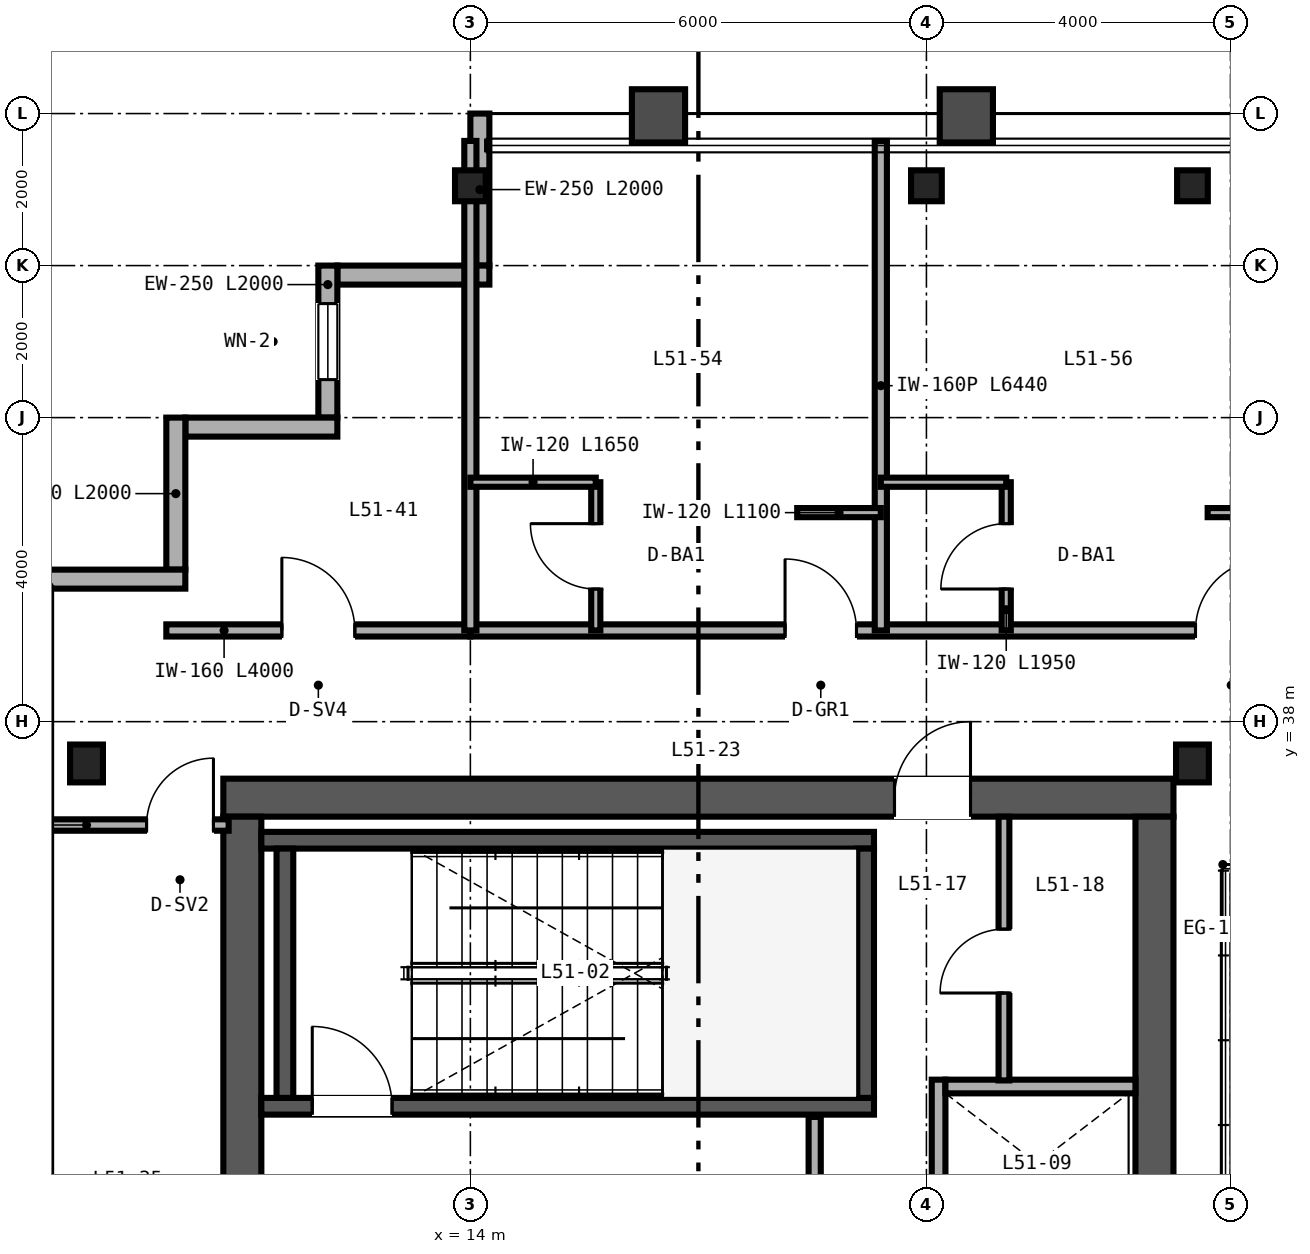
"""IFC4 building model, lengths in metres.
Left out: names, types, materials, properties, quantities, classifications, styles, units other than length and angle.
Written with IfcOpenShell. Run it as: python <this file> out.ifc"""

import sys

from ifc_helpers import new_model, si_unit, direction, frame, frame_2d, origin, origin_2d, place, context, subcontext, project, spatial, rectangle, i_section, extrude, source, transform, mapped, element, fill, save


model = new_model("IFC4")
c1 = context("Model", 3, precision=1e-05, world=origin(), true_north=direction((0.0, 1.0)))
c2 = subcontext(c1, "Body", "Model", "MODEL_VIEW")
j1 = project(units=[si_unit("LENGTHUNIT", "METRE"), si_unit("PLANEANGLEUNIT", "RADIAN")], contexts=[c1])
p1 = place(None, origin())
s1 = spatial("IfcSite", under=j1, at=p1, CompositionType="ELEMENT")
p2 = place(p1, origin())
s2 = spatial("IfcBuilding", under=s1, at=p2, CompositionType="ELEMENT")
p3 = place(p2, frame((0.0, 0.0, 202.8)))
s3 = spatial("IfcBuildingStorey", under=s2, at=p3, CompositionType="ELEMENT", Elevation=202.8)
p4 = place(p3, frame((10.75, 37.0, 0.0), z_axis=(0.0, 0.0, 1.0), x_axis=(1.0, 0.0, 0.0)))
e1 = element("IfcWall", 1, at=p4, inside=s3, PredefinedType="SHEAR", context=c2, shape_type="SweptSolid", body=[
    extrude(rectangle(XDim=12.5, YDim=0.5, at=frame_2d((6.25, 0.0))), origin(), (0.0, 0.0, 1.0), 3.37),
])
p5 = place(p4, frame((8.83, 0.0, 0.0)))
e2 = element("IfcOpeningElement", 2, at=p5, cuts=e1, PredefinedType="OPENING", context=c2, shape_type="SweptSolid", body=[
    extrude(rectangle(XDim=1.0, YDim=2.15, at=frame_2d((0.5, 1.075))), frame((0.0, 0.26, 0.0), z_axis=(0.0, -1.0, 0.0), x_axis=(1.0, 0.0, 0.0)), (0.0, 0.0, 1.0), 0.52),
])
for number, where, z_axis, x_axis in (
    (3, (11.0, 15.25, 0.0), (0.0, 0.0, 1.0), (0.0, 1.0, 0.0)),
    (4, (23.0, 15.25, 0.0), (0.0, 0.0, 1.0), (0.0, 1.0, 0.0)),
):
    element("IfcWall", number, at=place(p3, frame(where, z_axis=z_axis, x_axis=x_axis)), inside=s3, PredefinedType="SHEAR", context=c2, shape_type="SweptSolid", body=[
        extrude(rectangle(XDim=21.5, YDim=0.5, at=frame_2d((10.75, 0.0))), origin(), (0.0, 0.0, 1.0), 3.37),
    ])
p6 = place(p3, frame((11.25, 32.94, 0.0), z_axis=(0.0, 0.0, 1.0), x_axis=(1.0, 0.0, 0.0)))
e5 = element("IfcWall", 5, at=p6, inside=s3, PredefinedType="SHEAR", context=c2, shape_type="SweptSolid", body=[
    extrude(rectangle(XDim=8.06, YDim=0.22, at=frame_2d((4.03, 0.0))), origin(), (0.0, 0.0, 1.0), 3.4),
])
p7 = place(p6, frame((0.67, 0.0, 0.0)))
e6 = element("IfcOpeningElement", 6, at=p7, cuts=e5, PredefinedType="OPENING", context=c2, shape_type="SweptSolid", body=[
    extrude(rectangle(XDim=1.05, YDim=2.15, at=frame_2d((0.525, 1.075))), frame((0.0, 0.12, 0.0), z_axis=(0.0, -1.0, 0.0), x_axis=(1.0, 0.0, 0.0)), (0.0, 0.0, 1.0), 0.24),
])
p8 = place(p3, frame((11.25, 36.44, 0.0), z_axis=(0.0, 0.0, 1.0), x_axis=(1.0, 0.0, 0.0)))
e7 = element("IfcWall", 7, at=p8, inside=s3, PredefinedType="SHEAR", context=c2, shape_type="SweptSolid", body=[
    extrude(rectangle(XDim=8.06, YDim=0.22, at=frame_2d((4.03, 0.0))), origin(), (0.0, 0.0, 1.0), 3.4),
])
for number, where, z_axis, x_axis in (
    (8, (11.56, 33.05, 0.0), (0.0, 0.0, 1.0), (0.0, 1.0, 0.0)),
    (9, (19.2, 33.05, 0.0), (0.0, 0.0, 1.0), (0.0, 1.0, 0.0)),
):
    element("IfcWall", number, at=place(p3, frame(where, z_axis=z_axis, x_axis=x_axis)), inside=s3, PredefinedType="SHEAR", context=c2, shape_type="SweptSolid", body=[
        extrude(rectangle(XDim=3.28, YDim=0.22, at=frame_2d((1.64, 0.0))), origin(), (0.0, 0.0, 1.0), 3.4),
    ])
m1 = source(origin(), c2, "Body", "SweptSolid", [
    extrude(i_section(OverallWidth=0.432, OverallDepth=0.498, WebThickness=0.056, FlangeThickness=0.089, FilletRadius=0.025, at=origin_2d()), origin(), (0.0, 0.0, 1.0), 3.37),
])
for number, where, z_axis, x_axis in (
    (10, (8.95, 37.45, 0.0), (0.0, 0.0, 1.0), (1.0, 0.0, 0.0)),
    (11, (23.5, 37.45, 0.0), (0.0, 0.0, 1.0), (1.0, 0.0, 0.0)),
):
    element("IfcColumn", number, at=place(p3, frame(where, z_axis=z_axis, x_axis=x_axis)), inside=s3, PredefinedType="COLUMN", context=c2, shape_type="MappedRepresentation", body=[
        mapped(m1, transform((0.0, 0.0, 0.0), scale=1.0)),
    ])
m2 = source(origin(), c2, "Body", "SweptSolid", [
    extrude(i_section(OverallWidth=0.404, OverallDepth=0.407, WebThickness=0.027, FlangeThickness=0.044, FilletRadius=0.025, at=origin_2d()), origin(), (0.0, 0.0, 1.0), 3.37),
])
for number, where, z_axis, x_axis in (
    (12, (14.0, 45.05, 0.0), (0.0, 0.0, 1.0), (1.0, 0.0, 0.0)),
    (13, (20.0, 45.05, 0.0), (0.0, 0.0, 1.0), (1.0, 0.0, 0.0)),
    (14, (23.5, 45.05, 0.0), (0.0, 0.0, 1.0), (1.0, 0.0, 0.0)),
):
    element("IfcColumn", number, at=place(p3, frame(where, z_axis=z_axis, x_axis=x_axis)), inside=s3, PredefinedType="COLUMN", context=c2, shape_type="MappedRepresentation", body=[
        mapped(m2, transform((0.0, 0.0, 0.0), scale=1.0)),
    ])
p9 = place(p3, frame((14.125, 46.0, 0.0), z_axis=(0.0, 0.0, 1.0), x_axis=(0.0, -1.0, 0.0)))
e15 = element("IfcWall", 15, at=p9, inside=s3, PredefinedType="SOLIDWALL", context=c2, shape_type="SweptSolid", body=[
    extrude(rectangle(XDim=2.0, YDim=0.25, at=frame_2d((1.0, 0.0))), origin(), (0.0, 0.0, 1.0), 2.677),
])
p10 = place(p3, frame((14.25, 43.875, 0.0), z_axis=(0.0, 0.0, 1.0), x_axis=(-1.0, 0.0, 0.0)))
e16 = element("IfcWall", 16, at=p10, inside=s3, PredefinedType="SOLIDWALL", context=c2, shape_type="SweptSolid", body=[
    extrude(rectangle(XDim=2.0, YDim=0.25, at=frame_2d((1.0, 0.0))), origin(), (0.0, 0.0, 1.0), 3.37),
])
p11 = place(p3, frame((12.125, 44.0, 0.0), z_axis=(0.0, 0.0, 1.0), x_axis=(0.0, -1.0, 0.0)))
e17 = element("IfcWall", 17, at=p11, inside=s3, PredefinedType="SOLIDWALL", context=c2, shape_type="SweptSolid", body=[
    extrude(rectangle(XDim=2.0, YDim=0.25, at=frame_2d((1.0, 0.0))), origin(), (0.0, 0.0, 1.0), 3.37),
])
p12 = place(p11, frame((0.5, 0.0, 0.85)))
e18 = element("IfcOpeningElement", 18, at=p12, cuts=e17, PredefinedType="OPENING", context=c2, shape_type="SweptSolid", body=[
    extrude(rectangle(XDim=1.0, YDim=1.9, at=frame_2d((0.5, 0.95))), frame((0.0, 0.135, 0.0), z_axis=(0.0, -1.0, 0.0), x_axis=(1.0, 0.0, 0.0)), (0.0, 0.0, 1.0), 0.27),
])
for number, where, z_axis, x_axis in (
    (19, (12.25, 41.875, 0.0), (0.0, 0.0, 1.0), (-1.0, 0.0, 0.0)),
    (20, (10.125, 42.0, 0.0), (0.0, 0.0, 1.0), (0.0, -1.0, 0.0)),
):
    element("IfcWall", number, at=place(p3, frame(where, z_axis=z_axis, x_axis=x_axis)), inside=s3, PredefinedType="SOLIDWALL", context=c2, shape_type="SweptSolid", body=[
        extrude(rectangle(XDim=2.0, YDim=0.25, at=frame_2d((1.0, 0.0))), origin(), (0.0, 0.0, 1.0), 3.37),
    ])
p13 = place(p3, frame((10.25, 39.875, 0.0), z_axis=(0.0, 0.0, 1.0), x_axis=(-1.0, 0.0, 0.0)))
e21 = element("IfcWall", 21, at=p13, inside=s3, PredefinedType="SOLIDWALL", context=c2, shape_type="SweptSolid", body=[
    extrude(rectangle(XDim=2.25, YDim=0.25, at=frame_2d((1.125, 0.0))), origin(), (0.0, 0.0, 1.0), 3.37),
])
p14 = place(p3, frame((20.16, 29.0, 0.0), z_axis=(0.0, 0.0, 1.0), x_axis=(0.0, 1.0, 0.0)))
e22 = element("IfcWall", 22, at=p14, inside=s3, PredefinedType="SOLIDWALL", context=c2, shape_type="SweptSolid", body=[
    extrude(rectangle(XDim=4.29, YDim=0.18, at=frame_2d((2.145, 0.0))), origin(), (0.0, 0.0, 1.0), 3.37),
])
p15 = place(p3, frame((20.25, 33.2, 0.0), z_axis=(0.0, 0.0, 1.0), x_axis=(1.0, 0.0, 0.0)))
e23 = element("IfcWall", 23, at=p15, inside=s3, PredefinedType="SOLIDWALL", context=c2, shape_type="SweptSolid", body=[
    extrude(rectangle(XDim=2.5, YDim=0.18, at=frame_2d((1.25, 0.0))), origin(), (0.0, 0.0, 1.0), 3.37),
])
p16 = place(p3, frame((18.53, 28.9, 0.0), z_axis=(0.0, 0.0, 1.0), x_axis=(0.0, 1.0, 0.0)))
e24 = element("IfcWall", 24, at=p16, inside=s3, PredefinedType="PARTITIONING", context=c2, shape_type="SweptSolid", body=[
    extrude(rectangle(XDim=3.9, YDim=0.16, at=frame_2d((1.95, 0.0))), origin(), (0.0, 0.0, 1.0), 3.37),
])
p17 = place(p16, frame((1.5, 0.0, 0.0)))
e25 = element("IfcOpeningElement", 25, at=p17, cuts=e24, PredefinedType="OPENING", context=c2, shape_type="SweptSolid", body=[
    extrude(rectangle(XDim=1.0, YDim=2.15, at=frame_2d((0.5, 1.075))), frame((0.0, 0.09, 0.0), z_axis=(0.0, -1.0, 0.0), x_axis=(1.0, 0.0, 0.0)), (0.0, 0.0, 1.0), 0.18),
])
p18 = place(p3, frame((21.02, 33.28, 0.0), z_axis=(0.0, 0.0, 1.0), x_axis=(0.0, 1.0, 0.0)))
e26 = element("IfcWall", 26, at=p18, inside=s3, PredefinedType="PARTITIONING", context=c2, shape_type="SweptSolid", body=[
    extrude(rectangle(XDim=3.47, YDim=0.142, at=frame_2d((1.735, 0.0))), origin(), (0.0, 0.0, 1.0), 3.37),
])
p19 = place(p18, frame((1.15, 0.0, 0.0)))
e27 = element("IfcOpeningElement", 27, at=p19, cuts=e26, PredefinedType="OPENING", context=c2, shape_type="SweptSolid", body=[
    extrude(rectangle(XDim=0.84, YDim=2.1, at=frame_2d((0.42, 1.05))), frame((0.0, 0.081, 0.0), z_axis=(0.0, -1.0, 0.0), x_axis=(1.0, 0.0, 0.0)), (0.0, 0.0, 1.0), 0.162),
])
p20 = place(p3, frame((8.16, 36.64, 0.0), z_axis=(0.0, 0.0, 1.0), x_axis=(1.0, 0.0, 0.0)))
e28 = element("IfcWall", 28, at=p20, inside=s3, PredefinedType="PARTITIONING", context=c2, shape_type="SweptSolid", body=[
    extrude(rectangle(XDim=2.66, YDim=0.15, at=frame_2d((1.33, 0.0))), origin(), (0.0, 0.0, 1.0), 2.753),
])
p21 = place(p20, frame((1.58, 0.0, 0.0)))
e29 = element("IfcOpeningElement", 29, at=p21, cuts=e28, PredefinedType="OPENING", context=c2, shape_type="SweptSolid", body=[
    extrude(rectangle(XDim=0.88, YDim=2.15, at=frame_2d((0.44, 1.075))), frame((0.0, 0.085, 0.0), z_axis=(0.0, -1.0, 0.0), x_axis=(1.0, 0.0, 0.0)), (0.0, 0.0, 1.0), 0.17),
])
p22 = place(p3, frame((10.0, 39.2, 0.0), z_axis=(0.0, 0.0, 1.0), x_axis=(1.0, 0.0, 0.0)))
e30 = element("IfcWall", 30, at=p22, inside=s3, PredefinedType="PARTITIONING", context=c2, shape_type="SweptSolid", body=[
    extrude(rectangle(XDim=4.0, YDim=0.16, at=frame_2d((2.0, 0.0))), origin(), (0.0, 0.0, 1.0), 3.37),
])
p23 = place(p22, frame((1.52, 0.0, 0.0)))
e31 = element("IfcOpeningElement", 31, at=p23, cuts=e30, PredefinedType="OPENING", context=c2, shape_type="SweptSolid", body=[
    extrude(rectangle(XDim=0.96, YDim=2.15, at=frame_2d((0.48, 1.075))), frame((0.0, 0.09, 0.0), z_axis=(0.0, -1.0, 0.0), x_axis=(1.0, 0.0, 0.0)), (0.0, 0.0, 1.0), 0.18),
])
p24 = place(p3, frame((14.0, 39.2, 0.0), z_axis=(0.0, 0.0, 1.0), x_axis=(1.0, 0.0, 0.0)))
e32 = element("IfcWall", 32, at=p24, inside=s3, PredefinedType="PARTITIONING", context=c2, shape_type="SweptSolid", body=[
    extrude(rectangle(XDim=36.0, YDim=0.16, at=frame_2d((18.0, 0.0))), origin(), (0.0, 0.0, 1.0), 2.913),
])
p25 = place(p24, frame((4.14, 0.0, 0.0)))
e33 = element("IfcOpeningElement", 33, at=p25, cuts=e32, PredefinedType="OPENING", context=c2, shape_type="SweptSolid", body=[
    extrude(rectangle(XDim=0.94, YDim=2.15, at=frame_2d((0.47, 1.075))), frame((0.0, 0.09, 0.0), z_axis=(0.0, -1.0, 0.0), x_axis=(1.0, 0.0, 0.0)), (0.0, 0.0, 1.0), 0.18),
])
p26 = place(p24, frame((9.54, 0.0, 0.0)))
e34 = element("IfcOpeningElement", 34, at=p26, cuts=e32, PredefinedType="OPENING", context=c2, shape_type="SweptSolid", body=[
    extrude(rectangle(XDim=0.94, YDim=2.15, at=frame_2d((0.47, 1.075))), frame((0.0, 0.09, 0.0), z_axis=(0.0, -1.0, 0.0), x_axis=(1.0, 0.0, 0.0)), (0.0, 0.0, 1.0), 0.18),
])
p27 = place(p24, frame((13.32, 0.0, 0.0)))
e35 = element("IfcOpeningElement", 35, at=p27, cuts=e32, PredefinedType="OPENING", context=c2, shape_type="SweptSolid", body=[
    extrude(rectangle(XDim=0.96, YDim=2.15, at=frame_2d((0.48, 1.075))), frame((0.0, 0.09, 0.0), z_axis=(0.0, -1.0, 0.0), x_axis=(1.0, 0.0, 0.0)), (0.0, 0.0, 1.0), 0.18),
])
p28 = place(p24, frame((21.54, 0.0, 0.0)))
e36 = element("IfcOpeningElement", 36, at=p28, cuts=e32, PredefinedType="OPENING", context=c2, shape_type="SweptSolid", body=[
    extrude(rectangle(XDim=0.94, YDim=2.15, at=frame_2d((0.47, 1.075))), frame((0.0, 0.09, 0.0), z_axis=(0.0, -1.0, 0.0), x_axis=(1.0, 0.0, 0.0)), (0.0, 0.0, 1.0), 0.18),
])
p29 = place(p24, frame((28.14, 0.0, 0.0)))
e37 = element("IfcOpeningElement", 37, at=p29, cuts=e32, PredefinedType="OPENING", context=c2, shape_type="SweptSolid", body=[
    extrude(rectangle(XDim=0.94, YDim=2.15, at=frame_2d((0.47, 1.075))), frame((0.0, 0.09, 0.0), z_axis=(0.0, -1.0, 0.0), x_axis=(1.0, 0.0, 0.0)), (0.0, 0.0, 1.0), 0.18),
])
p30 = place(p24, frame((34.74, 0.0, 0.0)))
e38 = element("IfcOpeningElement", 38, at=p30, cuts=e32, PredefinedType="OPENING", context=c2, shape_type="SweptSolid", body=[
    extrude(rectangle(XDim=0.94, YDim=2.15, at=frame_2d((0.47, 1.075))), frame((0.0, 0.09, 0.0), z_axis=(0.0, -1.0, 0.0), x_axis=(1.0, 0.0, 0.0)), (0.0, 0.0, 1.0), 0.18),
])
for number, where, z_axis, x_axis in (
    (39, (14.0, 39.2, 0.0), (0.0, 0.0, 1.0), (0.0, 1.0, 0.0)),
    (40, (19.4, 39.2, 0.0), (0.0, 0.0, 1.0), (0.0, 1.0, 0.0)),
):
    element("IfcWall", number, at=place(p3, frame(where, z_axis=z_axis, x_axis=x_axis)), inside=s3, PredefinedType="PARTITIONING", context=c2, shape_type="SweptSolid", body=[
        extrude(rectangle(XDim=6.44, YDim=0.16, at=frame_2d((3.22, 0.0))), origin(), (0.0, 0.0, 1.0), 2.677),
    ])
p31 = place(p3, frame((15.65, 39.2, 0.0), z_axis=(0.0, 0.0, 1.0), x_axis=(0.0, 1.0, 0.0)))
e41 = element("IfcWall", 41, at=p31, inside=s3, PredefinedType="PARTITIONING", context=c2, shape_type="SweptSolid", body=[
    extrude(rectangle(XDim=1.95, YDim=0.12, at=frame_2d((0.975, 0.0))), origin(), (0.0, 0.0, 1.0), 3.37),
])
p32 = place(p31, frame((0.545, 0.0, 0.0)))
e42 = element("IfcOpeningElement", 42, at=p32, cuts=e41, PredefinedType="OPENING", context=c2, shape_type="SweptSolid", body=[
    extrude(rectangle(XDim=0.86, YDim=2.1, at=frame_2d((0.43, 1.05))), frame((0.0, 0.07, 0.0), z_axis=(0.0, -1.0, 0.0), x_axis=(1.0, 0.0, 0.0)), (0.0, 0.0, 1.0), 0.14),
])
p33 = place(p3, frame((14.0, 41.15, 0.0), z_axis=(0.0, 0.0, 1.0), x_axis=(1.0, 0.0, 0.0)))
e43 = element("IfcWall", 43, at=p33, inside=s3, PredefinedType="PARTITIONING", context=c2, shape_type="SweptSolid", body=[
    extrude(rectangle(XDim=1.65, YDim=0.12, at=frame_2d((0.825, 0.0))), origin(), (0.0, 0.0, 1.0), 3.37),
])
p34 = place(p3, frame((18.3, 40.75, 0.0), z_axis=(0.0, 0.0, 1.0), x_axis=(1.0, 0.0, 0.0)))
e44 = element("IfcWall", 44, at=p34, inside=s3, PredefinedType="PARTITIONING", context=c2, shape_type="SweptSolid", body=[
    extrude(rectangle(XDim=1.1, YDim=0.12, at=frame_2d((0.55, 0.0))), origin(), (0.0, 0.0, 1.0), 3.37),
])
p35 = place(p3, frame((21.05, 39.2, 0.0), z_axis=(0.0, 0.0, 1.0), x_axis=(0.0, 1.0, 0.0)))
e45 = element("IfcWall", 45, at=p35, inside=s3, PredefinedType="PARTITIONING", context=c2, shape_type="SweptSolid", body=[
    extrude(rectangle(XDim=1.95, YDim=0.12, at=frame_2d((0.975, 0.0))), origin(), (0.0, 0.0, 1.0), 3.37),
])
p36 = place(p35, frame((0.545, 0.0, 0.0)))
e46 = element("IfcOpeningElement", 46, at=p36, cuts=e45, PredefinedType="OPENING", context=c2, shape_type="SweptSolid", body=[
    extrude(rectangle(XDim=0.86, YDim=2.1, at=frame_2d((0.43, 1.05))), frame((0.0, 0.07, 0.0), z_axis=(0.0, -1.0, 0.0), x_axis=(1.0, 0.0, 0.0)), (0.0, 0.0, 1.0), 0.14),
])
p37 = place(p3, frame((19.4, 41.15, 0.0), z_axis=(0.0, 0.0, 1.0), x_axis=(1.0, 0.0, 0.0)))
e47 = element("IfcWall", 47, at=p37, inside=s3, PredefinedType="PARTITIONING", context=c2, shape_type="SweptSolid", body=[
    extrude(rectangle(XDim=1.65, YDim=0.12, at=frame_2d((0.825, 0.0))), origin(), (0.0, 0.0, 1.0), 3.37),
])
p38 = place(p3, frame((23.7, 40.75, 0.0), z_axis=(0.0, 0.0, 1.0), x_axis=(1.0, 0.0, 0.0)))
e48 = element("IfcWall", 48, at=p38, inside=s3, PredefinedType="PARTITIONING", context=c2, shape_type="SweptSolid", body=[
    extrude(rectangle(XDim=1.1, YDim=0.12, at=frame_2d((0.55, 0.0))), origin(), (0.0, 0.0, 1.0), 2.913),
])
m3 = source(origin(), c2, "Body", "SweptSolid", [
    extrude(rectangle(XDim=1.0, YDim=1.9, at=frame_2d((0.5, 0.95))), frame((0.0, 0.03, 0.0), z_axis=(0.0, -1.0, 0.0), x_axis=(1.0, 0.0, 0.0)), (0.0, 0.0, 1.0), 0.06),
])
p39 = place(p12, origin())
e49 = element("IfcWindow", 49, at=p39, inside=s3, PartitioningType="SINGLE_PANEL", PredefinedType="WINDOW", context=c2, shape_type="MappedRepresentation", body=[
    mapped(m3, transform((0.0, 0.0, 0.0), scale=1.0)),
])
fill(e18, e49)
m4 = source(origin(), c2, "Body", "SweptSolid", [
    extrude(rectangle(XDim=1.05, YDim=2.15, at=frame_2d((0.525, 1.075))), frame((0.0, 0.025, 0.0), z_axis=(0.0, -1.0, 0.0), x_axis=(1.0, 0.0, 0.0)), (0.0, 0.0, 1.0), 0.05),
])
p40 = place(p7, origin())
e50 = element("IfcDoor", 50, at=p40, inside=s3, OperationType="SINGLE_SWING_LEFT", PredefinedType="DOOR", context=c2, shape_type="MappedRepresentation", body=[
    mapped(m4, transform((0.0, 0.0, 0.0), scale=1.0)),
])
fill(e6, e50)
m5 = source(origin(), c2, "Body", "SweptSolid", [
    extrude(rectangle(XDim=0.84, YDim=2.1, at=frame_2d((0.42, 1.05))), frame((0.0, 0.025, 0.0), z_axis=(0.0, -1.0, 0.0), x_axis=(1.0, 0.0, 0.0)), (0.0, 0.0, 1.0), 0.05),
])
p41 = place(p19, origin())
e51 = element("IfcDoor", 51, at=p41, inside=s3, OperationType="SINGLE_SWING_LEFT", PredefinedType="DOOR", context=c2, shape_type="MappedRepresentation", body=[
    mapped(m5, transform((0.0, 0.0, 0.0), scale=1.0)),
])
fill(e27, e51)
m6 = source(origin(), c2, "Body", "SweptSolid", [
    extrude(rectangle(XDim=1.0, YDim=2.15, at=frame_2d((0.5, 1.075))), frame((0.0, 0.025, 0.0), z_axis=(0.0, -1.0, 0.0), x_axis=(1.0, 0.0, 0.0)), (0.0, 0.0, 1.0), 0.05),
])
p42 = place(p5, origin())
e52 = element("IfcDoor", 52, at=p42, inside=s3, OperationType="SINGLE_SWING_RIGHT", PredefinedType="DOOR", context=c2, shape_type="MappedRepresentation", body=[
    mapped(m6, transform((0.0, 0.0, 0.0), scale=1.0)),
])
fill(e2, e52)
m7 = source(origin(), c2, "Body", "SweptSolid", [
    extrude(rectangle(XDim=0.88, YDim=2.15, at=frame_2d((0.44, 1.075))), frame((0.0, 0.025, 0.0), z_axis=(0.0, -1.0, 0.0), x_axis=(1.0, 0.0, 0.0)), (0.0, 0.0, 1.0), 0.05),
])
p43 = place(p21, origin())
e53 = element("IfcDoor", 53, at=p43, inside=s3, OperationType="SINGLE_SWING_RIGHT", PredefinedType="DOOR", context=c2, shape_type="MappedRepresentation", body=[
    mapped(m7, transform((0.0, 0.0, 0.0), scale=1.0)),
])
fill(e29, e53)
m8 = source(origin(), c2, "Body", "SweptSolid", [
    extrude(rectangle(XDim=0.96, YDim=2.15, at=frame_2d((0.48, 1.075))), frame((0.0, 0.025, 0.0), z_axis=(0.0, -1.0, 0.0), x_axis=(1.0, 0.0, 0.0)), (0.0, 0.0, 1.0), 0.05),
])
p44 = place(p23, origin())
e54 = element("IfcDoor", 54, at=p44, inside=s3, OperationType="SINGLE_SWING_LEFT", PredefinedType="DOOR", context=c2, shape_type="MappedRepresentation", body=[
    mapped(m8, transform((0.0, 0.0, 0.0), scale=1.0)),
])
fill(e31, e54)
m9 = source(origin(), c2, "Body", "SweptSolid", [
    extrude(rectangle(XDim=0.86, YDim=2.1, at=frame_2d((0.43, 1.05))), frame((0.0, 0.025, 0.0), z_axis=(0.0, -1.0, 0.0), x_axis=(1.0, 0.0, 0.0)), (0.0, 0.0, 1.0), 0.05),
])
p45 = place(p32, origin())
e55 = element("IfcDoor", 55, at=p45, inside=s3, OperationType="SINGLE_SWING_RIGHT", PredefinedType="DOOR", context=c2, shape_type="MappedRepresentation", body=[
    mapped(m9, transform((0.0, 0.0, 0.0), scale=1.0)),
])
fill(e42, e55)
p46 = place(p36, origin())
e56 = element("IfcDoor", 56, at=p46, inside=s3, OperationType="SINGLE_SWING_LEFT", PredefinedType="DOOR", context=c2, shape_type="MappedRepresentation", body=[
    mapped(m9, transform((0.0, 0.0, 0.0), scale=1.0)),
])
fill(e46, e56)
m10 = source(origin(), c2, "Body", "SweptSolid", [
    extrude(rectangle(XDim=0.94, YDim=2.15, at=frame_2d((0.47, 1.075))), frame((0.0, 0.025, 0.0), z_axis=(0.0, -1.0, 0.0), x_axis=(1.0, 0.0, 0.0)), (0.0, 0.0, 1.0), 0.05),
])
p47 = place(p25, origin())
e57 = element("IfcDoor", 57, at=p47, inside=s3, OperationType="SINGLE_SWING_LEFT", PredefinedType="DOOR", context=c2, shape_type="MappedRepresentation", body=[
    mapped(m10, transform((0.0, 0.0, 0.0), scale=1.0)),
])
fill(e33, e57)
p48 = place(p26, origin())
e58 = element("IfcDoor", 58, at=p48, inside=s3, OperationType="SINGLE_SWING_RIGHT", PredefinedType="DOOR", context=c2, shape_type="MappedRepresentation", body=[
    mapped(m10, transform((0.0, 0.0, 0.0), scale=1.0)),
])
fill(e34, e58)
save(model, sys.argv[1])
